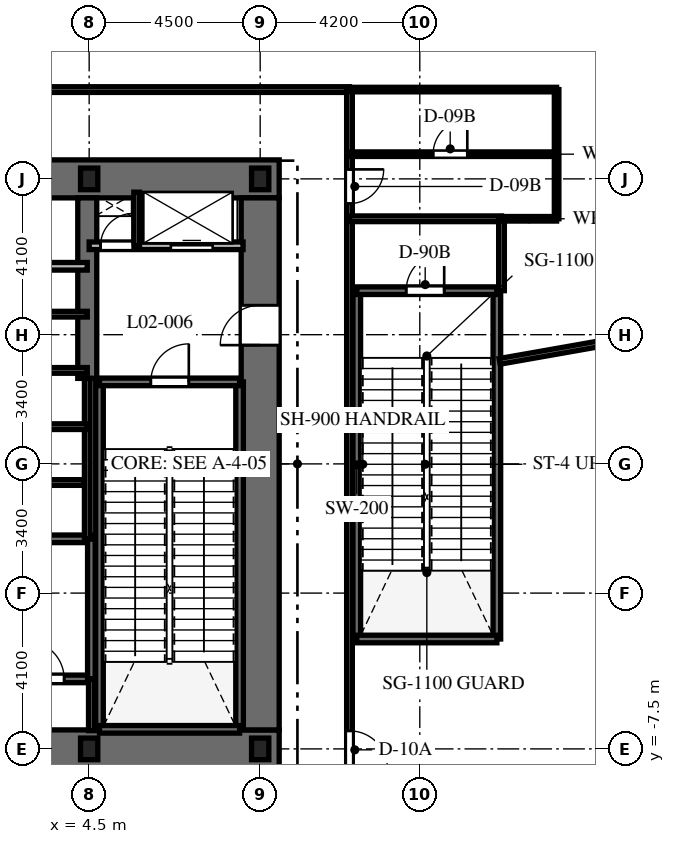
"""IFC4 building model, lengths in metres.
Left out: names, types, materials, properties, quantities, classifications, styles, units other than length and angle.
Written with IfcOpenShell. Run it as: python <this file> out.ifc"""

import sys

from ifc_helpers import new_model, si_unit, direction, frame, frame_2d, origin, origin_2d, place, context, subcontext, project, spatial, rectangle, i_section, extrude, element, fill, save


model = new_model("IFC4")
c1 = context("Model", 3, precision=1e-05, world=origin(), true_north=direction((0.0, 1.0)))
c2 = subcontext(c1, "Body", "Model", "MODEL_VIEW")
j1 = project(units=[si_unit("LENGTHUNIT", "METRE"), si_unit("PLANEANGLEUNIT", "RADIAN")], contexts=[c1])
p1 = place(None, origin())
s1 = spatial("IfcSite", under=j1, at=p1, CompositionType="ELEMENT")
p2 = place(p1, origin())
s2 = spatial("IfcBuilding", under=s1, at=p2, CompositionType="ELEMENT")
p3 = place(p2, frame((0.0, 0.0, 11.4)))
s3 = spatial("IfcBuildingStorey", under=s2, at=p3, CompositionType="ELEMENT", Elevation=11.4)
p4 = place(p3, frame((-9.5, -7.5, 0.0), z_axis=(0.0, 0.0, 1.0), x_axis=(1.0, 0.0, 0.0)))
e1 = element("IfcWall", 1, at=p4, inside=s3, PredefinedType="SHEAR", context=c2, shape_type="SweptSolid", body=[
    extrude(rectangle(XDim=19.0, YDim=1.0, at=frame_2d((9.5, 0.0))), origin(), (0.0, 0.0, 1.0), 7.2),
])
p5 = place(p4, frame((9.55, 0.0, 0.0)))
e2 = element("IfcOpeningElement", 2, at=p5, cuts=e1, PredefinedType="OPENING", context=c2, shape_type="SweptSolid", body=[
    extrude(rectangle(XDim=1.0, YDim=2.15, at=frame_2d((0.5, 1.075))), frame((0.0, 0.51, 0.0), z_axis=(0.0, -1.0, 0.0), x_axis=(1.0, 0.0, 0.0)), (0.0, 0.0, 1.0), 1.02),
])
p6 = place(p3, frame((1.85, 7.5, 0.0), z_axis=(0.0, 0.0, 1.0), x_axis=(1.0, 0.0, 0.0)))
e3 = element("IfcWall", 3, at=p6, inside=s3, PredefinedType="SHEAR", context=c2, shape_type="SweptSolid", body=[
    extrude(rectangle(XDim=7.65, YDim=1.0, at=frame_2d((3.825, 0.0))), origin(), (0.0, 0.0, 1.0), 7.2),
])
p7 = place(p3, frame((9.0, -7.0, 0.0), z_axis=(0.0, 0.0, 1.0), x_axis=(0.0, 1.0, 0.0)))
e4 = element("IfcWall", 4, at=p7, inside=s3, PredefinedType="SHEAR", context=c2, shape_type="SweptSolid", body=[
    extrude(rectangle(XDim=14.0, YDim=1.0, at=frame_2d((7.0, 0.0))), origin(), (0.0, 0.0, 1.0), 7.2),
])
p8 = place(p7, frame((10.125, 0.0, 0.0)))
e5 = element("IfcOpeningElement", 5, at=p8, cuts=e4, PredefinedType="OPENING", context=c2, shape_type="SweptSolid", body=[
    extrude(rectangle(XDim=1.05, YDim=2.15, at=frame_2d((0.525, 1.075))), frame((0.0, 0.51, 0.0), z_axis=(0.0, -1.0, 0.0), x_axis=(1.0, 0.0, 0.0)), (0.0, 0.0, 1.0), 1.02),
])
p9 = place(p3, frame((4.45, 2.25, 0.0), z_axis=(0.0, 0.0, 1.0), x_axis=(0.0, 1.0, 0.0)))
e6 = element("IfcWall", 6, at=p9, inside=s3, PredefinedType="SHEAR", context=c2, shape_type="SweptSolid", body=[
    extrude(rectangle(XDim=4.75, YDim=0.5, at=frame_2d((2.375, 0.0))), origin(), (0.0, 0.0, 1.0), 7.2),
])
for number, where, z_axis, x_axis in (
    (7, (4.772, -6.985, 0.0), (0.0, 0.0, 1.0), (0.0, 1.0, 0.0)),
    (8, (8.458, -6.985, 0.0), (0.0, 0.0, 1.0), (0.0, 1.0, 0.0)),
):
    element("IfcWall", number, at=place(p3, frame(where, z_axis=z_axis, x_axis=x_axis)), inside=s3, PredefinedType="SHEAR", context=c2, shape_type="SweptSolid", body=[
        extrude(rectangle(XDim=9.143, YDim=0.2, at=frame_2d((4.572, 0.0))), origin(), (0.0, 0.0, 1.0), 7.2),
    ])
p10 = place(p3, frame((4.772, -6.985, 0.0), z_axis=(0.0, 0.0, 1.0), x_axis=(1.0, 0.0, 0.0)))
e9 = element("IfcWall", 9, at=p10, inside=s3, PredefinedType="SHEAR", context=c2, shape_type="SweptSolid", body=[
    extrude(rectangle(XDim=3.686, YDim=0.2, at=frame_2d((1.843, 0.0))), origin(), (0.0, 0.0, 1.0), 7.2),
])
p11 = place(p3, frame((4.772, 2.158, 0.0), z_axis=(0.0, 0.0, 1.0), x_axis=(1.0, 0.0, 0.0)))
e10 = element("IfcWall", 10, at=p11, inside=s3, PredefinedType="SHEAR", context=c2, shape_type="SweptSolid", body=[
    extrude(rectangle(XDim=3.686, YDim=0.2, at=frame_2d((1.843, 0.0))), origin(), (0.0, 0.0, 1.0), 7.2),
])
p12 = place(p11, frame((1.35, 0.0, 0.0)))
e11 = element("IfcOpeningElement", 11, at=p12, cuts=e10, PredefinedType="OPENING", context=c2, shape_type="SweptSolid", body=[
    extrude(rectangle(XDim=1.0, YDim=2.15, at=frame_2d((0.5, 1.075))), frame((0.0, 0.11, 0.0), z_axis=(0.0, -1.0, 0.0), x_axis=(1.0, 0.0, 0.0)), (0.0, 0.0, 1.0), 0.22),
])
p13 = place(p3, frame((-4.608, -5.658, 0.0), z_axis=(0.0, 0.0, 1.0), x_axis=(1.0, 0.0, 0.0)))
e12 = element("IfcWall", 12, at=p13, inside=s3, PredefinedType="SHEAR", context=c2, shape_type="SweptSolid", body=[
    extrude(rectangle(XDim=9.166, YDim=0.2, at=frame_2d((4.583, 0.0))), origin(), (0.0, 0.0, 1.0), 7.2),
])
p14 = place(p13, frame((7.45, 0.0, 0.0)))
e13 = element("IfcOpeningElement", 13, at=p14, cuts=e12, PredefinedType="OPENING", context=c2, shape_type="SweptSolid", body=[
    extrude(rectangle(XDim=1.0, YDim=2.15, at=frame_2d((0.5, 1.075))), frame((0.0, 0.11, 0.0), z_axis=(0.0, -1.0, 0.0), x_axis=(1.0, 0.0, 0.0)), (0.0, 0.0, 1.0), 0.22),
])
p15 = place(p3, frame((-4.608, -1.972, 0.0), z_axis=(0.0, 0.0, 1.0), x_axis=(1.0, 0.0, 0.0)))
e14 = element("IfcWall", 14, at=p15, inside=s3, PredefinedType="SHEAR", context=c2, shape_type="SweptSolid", body=[
    extrude(rectangle(XDim=9.166, YDim=0.2, at=frame_2d((4.583, 0.0))), origin(), (0.0, 0.0, 1.0), 7.2),
])
p16 = place(p3, frame((4.558, -5.658, 0.0), z_axis=(0.0, 0.0, 1.0), x_axis=(0.0, 1.0, 0.0)))
e15 = element("IfcWall", 15, at=p16, inside=s3, PredefinedType="SHEAR", context=c2, shape_type="SweptSolid", body=[
    extrude(rectangle(XDim=3.686, YDim=0.2, at=frame_2d((1.843, 0.0))), origin(), (0.0, 0.0, 1.0), 7.2),
])
for number, where, z_axis, x_axis in (
    (16, (11.542, -4.608, 0.0), (0.0, 0.0, 1.0), (0.0, 1.0, 0.0)),
    (17, (15.228, -4.608, 0.0), (0.0, 0.0, 1.0), (0.0, 1.0, 0.0)),
):
    element("IfcWall", number, at=place(p3, frame(where, z_axis=z_axis, x_axis=x_axis)), inside=s3, PredefinedType="SHEAR", context=c2, shape_type="SweptSolid", body=[
        extrude(rectangle(XDim=9.166, YDim=0.2, at=frame_2d((4.583, 0.0))), origin(), (0.0, 0.0, 1.0), 7.2),
    ])
p17 = place(p3, frame((11.542, -4.608, 0.0), z_axis=(0.0, 0.0, 1.0), x_axis=(1.0, 0.0, 0.0)))
e18 = element("IfcWall", 18, at=p17, inside=s3, PredefinedType="SHEAR", context=c2, shape_type="SweptSolid", body=[
    extrude(rectangle(XDim=3.686, YDim=0.2, at=frame_2d((1.843, 0.0))), origin(), (0.0, 0.0, 1.0), 7.2),
])
p18 = place(p3, frame((11.542, 4.558, 0.0), z_axis=(0.0, 0.0, 1.0), x_axis=(1.0, 0.0, 0.0)))
e19 = element("IfcWall", 19, at=p18, inside=s3, PredefinedType="SHEAR", context=c2, shape_type="SweptSolid", body=[
    extrude(rectangle(XDim=3.686, YDim=0.2, at=frame_2d((1.843, 0.0))), origin(), (0.0, 0.0, 1.0), 7.2),
])
p19 = place(p18, frame((1.3, 0.0, 0.0)))
e20 = element("IfcOpeningElement", 20, at=p19, cuts=e19, PredefinedType="OPENING", context=c2, shape_type="SweptSolid", body=[
    extrude(rectangle(XDim=1.0, YDim=2.15, at=frame_2d((0.5, 1.075))), frame((0.0, 0.11, 0.0), z_axis=(0.0, -1.0, 0.0), x_axis=(1.0, 0.0, 0.0)), (0.0, 0.0, 1.0), 0.22),
])
for number, where, z_axis, x_axis in (
    (21, (4.5, -7.5, 0.0), (0.0, 0.0, 1.0), (1.0, 0.0, 0.0)),
    (22, (9.0, -7.5, 0.0), (0.0, 0.0, 1.0), (1.0, 0.0, 0.0)),
    (23, (9.0, 7.5, 0.0), (0.0, 0.0, 1.0), (1.0, 0.0, 0.0)),
    (24, (4.5, 7.5, 0.0), (0.0, 0.0, 1.0), (1.0, 0.0, 0.0)),
):
    element("IfcColumn", number, at=place(p3, frame(where, z_axis=z_axis, x_axis=x_axis)), inside=s3, PredefinedType="COLUMN", context=c2, shape_type="SweptSolid", body=[
        extrude(i_section(OverallWidth=0.454, OverallDepth=0.569, WebThickness=0.078, FlangeThickness=0.125, at=origin_2d()), origin(), (0.0, 0.0, 1.0), 7.2),
    ])
p20 = place(p3, frame((4.558, -7.02, 0.0), z_axis=(0.0, 0.0, 1.0), x_axis=(0.0, 1.0, 0.0)))
e25 = element("IfcWall", 25, at=p20, inside=s3, PredefinedType="PARTITIONING", context=c2, shape_type="SweptSolid", body=[
    extrude(rectangle(XDim=1.362, YDim=0.15, at=frame_2d((0.681, 0.0))), origin(), (0.0, 0.0, 1.0), 6.88),
])
p21 = place(p3, frame((4.5, 5.74, 0.0), z_axis=(0.0, 0.0, 1.0), x_axis=(1.0, 0.0, 0.0)))
e26 = element("IfcWall", 26, at=p21, inside=s3, PredefinedType="PARTITIONING", context=c2, shape_type="SweptSolid", body=[
    extrude(rectangle(XDim=4.05, YDim=0.2, at=frame_2d((2.025, 0.0))), origin(), (0.0, 0.0, 1.0), 6.88),
])
p22 = place(p21, frame((0.3, 0.0, 0.0)))
e27 = element("IfcOpeningElement", 27, at=p22, cuts=e26, PredefinedType="OPENING", context=c2, shape_type="SweptSolid", body=[
    extrude(rectangle(XDim=0.85, YDim=2.03, at=frame_2d((0.425, 1.015))), frame((0.0, 0.11, 0.0), z_axis=(0.0, -1.0, 0.0), x_axis=(1.0, 0.0, 0.0)), (0.0, 0.0, 1.0), 0.22),
])
p23 = place(p21, frame((2.15, 0.0, 0.0)))
e28 = element("IfcOpeningElement", 28, at=p23, cuts=e26, PredefinedType="OPENING", context=c2, shape_type="SweptSolid", body=[
    extrude(rectangle(XDim=1.1, YDim=2.2, at=frame_2d((0.55, 1.1))), frame((0.0, 0.11, 0.0), z_axis=(0.0, -1.0, 0.0), x_axis=(1.0, 0.0, 0.0)), (0.0, 0.0, 1.0), 0.22),
])
p24 = place(p3, frame((5.75, 5.74, 0.0), z_axis=(0.0, 0.0, 1.0), x_axis=(0.0, 1.0, 0.0)))
e29 = element("IfcWall", 29, at=p24, inside=s3, PredefinedType="PARTITIONING", context=c2, shape_type="SweptSolid", body=[
    extrude(rectangle(XDim=1.41, YDim=0.15, at=frame_2d((0.705, 0.0))), origin(), (0.0, 0.0, 1.0), 6.88),
])
p25 = place(p3, frame((1.85, 5.2, 0.0), z_axis=(0.0, 0.0, 1.0), x_axis=(1.0, 0.0, 0.0)))
e30 = element("IfcWall", 30, at=p25, inside=s3, PredefinedType="PARTITIONING", context=c2, shape_type="SweptSolid", body=[
    extrude(rectangle(XDim=2.6, YDim=0.2, at=frame_2d((1.3, 0.0))), origin(), (0.0, 0.0, 1.0), 6.88),
])
p26 = place(p3, frame((4.45, -1.972, 0.0), z_axis=(0.0, 0.0, 1.0), x_axis=(0.0, 1.0, 0.0)))
e31 = element("IfcWall", 31, at=p26, inside=s3, PredefinedType="PARTITIONING", context=c2, shape_type="SweptSolid", body=[
    extrude(rectangle(XDim=4.222, YDim=0.15, at=frame_2d((2.111, 0.0))), origin(), (0.0, 0.0, 1.0), 6.88),
])
for number, where, z_axis, x_axis in (
    (32, (1.9, 3.94, 0.0), (0.0, 0.0, 1.0), (1.0, 0.0, 0.0)),
    (33, (1.9, 0.98, 0.0), (0.0, 0.0, 1.0), (1.0, 0.0, 0.0)),
    (34, (1.9, 2.46, 0.0), (0.0, 0.0, 1.0), (1.0, 0.0, 0.0)),
):
    element("IfcWall", number, at=place(p3, frame(where, z_axis=z_axis, x_axis=x_axis)), inside=s3, PredefinedType="PARTITIONING", context=c2, shape_type="SweptSolid", body=[
        extrude(rectangle(XDim=2.55, YDim=0.15, at=frame_2d((1.275, 0.0))), origin(), (0.0, 0.0, 1.0), 6.88),
    ])
p27 = place(p3, frame((-4.36, -0.49, 0.0), z_axis=(0.0, 0.0, 1.0), x_axis=(1.0, 0.0, 0.0)))
e35 = element("IfcWall", 35, at=p27, inside=s3, PredefinedType="PARTITIONING", context=c2, shape_type="SweptSolid", body=[
    extrude(rectangle(XDim=8.72, YDim=0.15, at=frame_2d((4.36, 0.0))), origin(), (0.0, 0.0, 1.0), 6.88),
])
p28 = place(p27, frame((2.81, 0.0, 0.0)))
e36 = element("IfcOpeningElement", 36, at=p28, cuts=e35, PredefinedType="OPENING", context=c2, shape_type="SweptSolid", body=[
    extrude(rectangle(XDim=0.85, YDim=2.03, at=frame_2d((0.425, 1.015))), frame((0.0, 0.085, 0.0), z_axis=(0.0, -1.0, 0.0), x_axis=(1.0, 0.0, 0.0)), (0.0, 0.0, 1.0), 0.17),
])
p29 = place(p27, frame((4.61, 0.0, 0.0)))
e37 = element("IfcOpeningElement", 37, at=p29, cuts=e35, PredefinedType="OPENING", context=c2, shape_type="SweptSolid", body=[
    extrude(rectangle(XDim=0.85, YDim=2.03, at=frame_2d((0.425, 1.015))), frame((0.0, 0.085, 0.0), z_axis=(0.0, -1.0, 0.0), x_axis=(1.0, 0.0, 0.0)), (0.0, 0.0, 1.0), 0.17),
])
p30 = place(p3, frame((-11.35, 9.85, 0.0), z_axis=(0.0, 0.0, 1.0), x_axis=(1.0, 0.0, 0.0)))
e38 = element("IfcWall", 38, at=p30, inside=s3, PredefinedType="PARTITIONING", context=c2, shape_type="SweptSolid", body=[
    extrude(rectangle(XDim=22.7, YDim=0.15, at=frame_2d((11.35, 0.0))), origin(), (0.0, 0.0, 1.0), 5.922),
])
p31 = place(p30, frame((12.236, 0.0, 0.0)))
e39 = element("IfcOpeningElement", 39, at=p31, cuts=e38, PredefinedType="OPENING", context=c2, shape_type="SweptSolid", body=[
    extrude(rectangle(XDim=1.0, YDim=2.03, at=frame_2d((0.5, 1.015))), frame((0.0, 0.085, 0.0), z_axis=(0.0, -1.0, 0.0), x_axis=(1.0, 0.0, 0.0)), (0.0, 0.0, 1.0), 0.17),
])
p32 = place(p3, frame((11.35, 9.85, 0.0), z_axis=(0.0, 0.0, 1.0), x_axis=(0.0, -1.0, 0.0)))
e40 = element("IfcWall", 40, at=p32, inside=s3, PredefinedType="PARTITIONING", context=c2, shape_type="SweptSolid", body=[
    extrude(rectangle(XDim=19.7, YDim=0.15, at=frame_2d((9.85, 0.0))), origin(), (0.0, 0.0, 1.0), 5.922),
])
p33 = place(p32, frame((2.1, 0.0, 0.0)))
e41 = element("IfcOpeningElement", 41, at=p33, cuts=e40, PredefinedType="OPENING", context=c2, shape_type="SweptSolid", body=[
    extrude(rectangle(XDim=0.9, YDim=2.03, at=frame_2d((0.45, 1.015))), frame((0.0, 0.085, 0.0), z_axis=(0.0, -1.0, 0.0), x_axis=(1.0, 0.0, 0.0)), (0.0, 0.0, 1.0), 0.17),
])
p34 = place(p32, frame((16.875, 0.0, 0.0)))
e42 = element("IfcOpeningElement", 42, at=p34, cuts=e40, PredefinedType="OPENING", context=c2, shape_type="SweptSolid", body=[
    extrude(rectangle(XDim=1.0, YDim=2.03, at=frame_2d((0.5, 1.015))), frame((0.0, 0.085, 0.0), z_axis=(0.0, -1.0, 0.0), x_axis=(1.0, 0.0, 0.0)), (0.0, 0.0, 1.0), 0.17),
])
p35 = place(p3, frame((11.35, 6.45, 0.0), z_axis=(0.0, 0.0, 1.0), x_axis=(1.0, 0.0, 0.0)))
e43 = element("IfcWall", 43, at=p35, inside=s3, PredefinedType="PARTITIONING", context=c2, shape_type="SweptSolid", body=[
    extrude(rectangle(XDim=4.0, YDim=0.15, at=frame_2d((2.0, 0.0))), origin(), (0.0, 0.0, 1.0), 6.88),
])
p36 = place(p3, frame((15.35, 4.558, 0.0), z_axis=(0.0, 0.0, 1.0), x_axis=(0.0, 1.0, 0.0)))
e44 = element("IfcWall", 44, at=p36, inside=s3, PredefinedType="PARTITIONING", context=c2, shape_type="SweptSolid", body=[
    extrude(rectangle(XDim=1.892, YDim=0.15, at=frame_2d((0.946, 0.0))), origin(), (0.0, 0.0, 1.0), 6.88),
])
p37 = place(p3, frame((15.35, 6.45, 0.0), z_axis=(0.0, 0.0, 1.0), x_axis=(1.0, 0.0, 0.0)))
e45 = element("IfcWall", 45, at=p37, inside=s3, PredefinedType="PARTITIONING", context=c2, shape_type="SweptSolid", body=[
    extrude(rectangle(XDim=1.45, YDim=0.12, at=frame_2d((0.725, 0.0))), origin(), (0.0, 0.0, 1.0), 6.88),
])
p38 = place(p3, frame((16.8, 6.45, 0.0), z_axis=(0.0, 0.0, 1.0), x_axis=(0.0, 1.0, 0.0)))
e46 = element("IfcWall", 46, at=p38, inside=s3, PredefinedType="PARTITIONING", context=c2, shape_type="SweptSolid", body=[
    extrude(rectangle(XDim=3.4, YDim=0.12, at=frame_2d((1.7, 0.0))), origin(), (0.0, 0.0, 1.0), 6.88),
])
p39 = place(p3, frame((11.35, 9.85, 0.0), z_axis=(0.0, 0.0, 1.0), x_axis=(1.0, 0.0, 0.0)))
e47 = element("IfcWall", 47, at=p39, inside=s3, PredefinedType="PARTITIONING", context=c2, shape_type="SweptSolid", body=[
    extrude(rectangle(XDim=5.45, YDim=0.12, at=frame_2d((2.725, 0.0))), origin(), (0.0, 0.0, 1.0), 6.014),
])
p40 = place(p3, frame((11.35, 8.15, 0.0), z_axis=(0.0, 0.0, 1.0), x_axis=(1.0, 0.0, 0.0)))
e48 = element("IfcWall", 48, at=p40, inside=s3, PredefinedType="PARTITIONING", context=c2, shape_type="SweptSolid", body=[
    extrude(rectangle(XDim=5.45, YDim=0.12, at=frame_2d((2.725, 0.0))), origin(), (0.0, 0.0, 1.0), 6.88),
])
p41 = place(p40, frame((2.2, 0.0, 0.0)))
e49 = element("IfcOpeningElement", 49, at=p41, cuts=e48, PredefinedType="OPENING", context=c2, shape_type="SweptSolid", body=[
    extrude(rectangle(XDim=0.9, YDim=2.03, at=frame_2d((0.45, 1.015))), frame((0.0, 0.07, 0.0), z_axis=(0.0, -1.0, 0.0), x_axis=(1.0, 0.0, 0.0)), (0.0, 0.0, 1.0), 0.14),
])
p42 = place(p3, frame((15.3, 2.698, 0.0), z_axis=(0.0, 0.0, 1.0), x_axis=(0.984806610591, 0.173654656533, 0.0)))
e50 = element("IfcWall", 50, at=p42, inside=s3, PredefinedType="PARTITIONING", context=c2, shape_type="SweptSolid", body=[
    extrude(rectangle(XDim=13.429, YDim=0.15, at=frame_2d((6.715, 0.0))), origin(), (0.0, 0.0, 1.0), 6.014),
])
p43 = place(p12, origin())
e51 = element("IfcDoor", 51, at=p43, inside=s3, OperationType="SINGLE_SWING_RIGHT", PredefinedType="DOOR", context=c2, shape_type="SweptSolid", body=[
    extrude(rectangle(XDim=1.0, YDim=2.15, at=frame_2d((0.5, 1.075))), frame((0.0, 0.025, 0.0), z_axis=(0.0, -1.0, 0.0), x_axis=(1.0, 0.0, 0.0)), (0.0, 0.0, 1.0), 0.05),
])
fill(e11, e51)
p44 = place(p14, origin())
e52 = element("IfcDoor", 52, at=p44, inside=s3, OperationType="SINGLE_SWING_LEFT", PredefinedType="DOOR", context=c2, shape_type="SweptSolid", body=[
    extrude(rectangle(XDim=1.0, YDim=2.15, at=frame_2d((0.5, 1.075))), frame((0.0, 0.025, 0.0), z_axis=(0.0, -1.0, 0.0), x_axis=(1.0, 0.0, 0.0)), (0.0, 0.0, 1.0), 0.05),
])
fill(e13, e52)
p45 = place(p8, origin())
e53 = element("IfcDoor", 53, at=p45, inside=s3, OperationType="SINGLE_SWING_LEFT", PredefinedType="DOOR", context=c2, shape_type="SweptSolid", body=[
    extrude(rectangle(XDim=1.05, YDim=2.15, at=frame_2d((0.525, 1.075))), frame((0.0, 0.025, 0.0), z_axis=(0.0, -1.0, 0.0), x_axis=(1.0, 0.0, 0.0)), (0.0, 0.0, 1.0), 0.05),
])
fill(e5, e53)
p46 = place(p22, origin())
e54 = element("IfcDoor", 54, at=p46, inside=s3, OperationType="SINGLE_SWING_RIGHT", PredefinedType="DOOR", context=c2, shape_type="SweptSolid", body=[
    extrude(rectangle(XDim=0.85, YDim=2.03, at=frame_2d((0.425, 1.015))), frame((0.0, 0.025, 0.0), z_axis=(0.0, -1.0, 0.0), x_axis=(1.0, 0.0, 0.0)), (0.0, 0.0, 1.0), 0.05),
])
fill(e27, e54)
p47 = place(p23, origin())
e55 = element("IfcDoor", 55, at=p47, inside=s3, OperationType="SLIDING_TO_RIGHT", PredefinedType="DOOR", context=c2, shape_type="SweptSolid", body=[
    extrude(rectangle(XDim=1.1, YDim=2.2, at=frame_2d((0.55, 1.1))), frame((0.0, 0.025, 0.0), z_axis=(0.0, -1.0, 0.0), x_axis=(1.0, 0.0, 0.0)), (0.0, 0.0, 1.0), 0.05),
])
fill(e28, e55)
p48 = place(p19, origin())
e56 = element("IfcDoor", 56, at=p48, inside=s3, OperationType="SINGLE_SWING_RIGHT", PredefinedType="DOOR", context=c2, shape_type="SweptSolid", body=[
    extrude(rectangle(XDim=1.0, YDim=2.15, at=frame_2d((0.5, 1.075))), frame((0.0, 0.025, 0.0), z_axis=(0.0, -1.0, 0.0), x_axis=(1.0, 0.0, 0.0)), (0.0, 0.0, 1.0), 0.05),
])
fill(e20, e56)
p49 = place(p33, origin())
e57 = element("IfcDoor", 57, at=p49, inside=s3, OperationType="SINGLE_SWING_LEFT", PredefinedType="DOOR", context=c2, shape_type="SweptSolid", body=[
    extrude(rectangle(XDim=0.9, YDim=2.03, at=frame_2d((0.45, 1.015))), frame((0.0, 0.025, 0.0), z_axis=(0.0, -1.0, 0.0), x_axis=(1.0, 0.0, 0.0)), (0.0, 0.0, 1.0), 0.05),
])
fill(e41, e57)
p50 = place(p41, origin())
e58 = element("IfcDoor", 58, at=p50, inside=s3, OperationType="SINGLE_SWING_RIGHT", PredefinedType="DOOR", context=c2, shape_type="SweptSolid", body=[
    extrude(rectangle(XDim=0.9, YDim=2.03, at=frame_2d((0.45, 1.015))), frame((0.0, 0.025, 0.0), z_axis=(0.0, -1.0, 0.0), x_axis=(1.0, 0.0, 0.0)), (0.0, 0.0, 1.0), 0.05),
])
fill(e49, e58)
p51 = place(p34, origin())
e59 = element("IfcDoor", 59, at=p51, inside=s3, OperationType="SINGLE_SWING_RIGHT", PredefinedType="DOOR", context=c2, shape_type="SweptSolid", body=[
    extrude(rectangle(XDim=1.0, YDim=2.03, at=frame_2d((0.5, 1.015))), frame((0.0, 0.025, 0.0), z_axis=(0.0, -1.0, 0.0), x_axis=(1.0, 0.0, 0.0)), (0.0, 0.0, 1.0), 0.05),
])
fill(e42, e59)
save(model, sys.argv[1])
